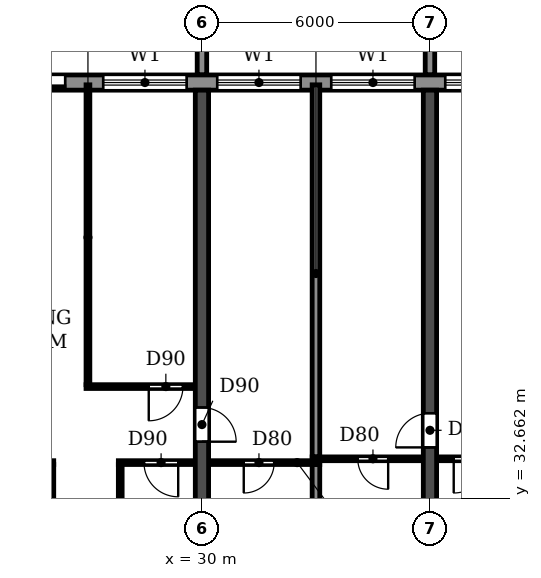
"""IFC4 building model, lengths in metres.
Left out: names, types, materials, properties, quantities, classifications, styles, units other than length and angle.
Written with IfcOpenShell. Run it as: python <this file> out.ifc"""

import sys

from ifc_helpers import new_model, si_unit, direction, frame, frame_2d, origin, place, context, subcontext, project, spatial, polyline, rectangle, outline, extrude, source, transform, mapped, element, fill, save


model = new_model("IFC4")
c1 = context("Model", 3, precision=1e-05, world=origin(), true_north=direction((0.0, 1.0)))
c2 = subcontext(c1, "Body", "Model", "MODEL_VIEW")
j1 = project(units=[si_unit("LENGTHUNIT", "METRE"), si_unit("PLANEANGLEUNIT", "RADIAN")], contexts=[c1])
p1 = place(None, origin())
s1 = spatial("IfcSite", under=j1, at=p1, CompositionType="ELEMENT")
p2 = place(p1, origin())
s2 = spatial("IfcBuilding", under=s1, at=p2, CompositionType="ELEMENT")
p3 = place(p2, frame((0.0, 0.0, 102.6)))
s3 = spatial("IfcBuildingStorey", under=s2, at=p3, CompositionType="ELEMENT", Elevation=102.6)
p4 = place(p3, frame((30.0, 30.525, 0.0), z_axis=(0.0, 0.0, 1.0), x_axis=(0.0, 1.0, 0.0)))
e1 = element("IfcWall", 1, at=p4, inside=s3, PredefinedType="SHEAR", context=c2, shape_type="SweptSolid", body=[
    extrude(rectangle(XDim=12.875, YDim=0.35, at=frame_2d((6.438, 0.0))), origin(), (0.0, 0.0, 1.0), 3.0),
])
p5 = place(p4, frame((3.625, 0.0, 0.0)))
e2 = element("IfcOpeningElement", 2, at=p5, cuts=e1, PredefinedType="OPENING", context=c2, shape_type="SweptSolid", body=[
    extrude(rectangle(XDim=0.9, YDim=2.1, at=frame_2d((0.45, 1.05))), frame((0.0, 0.185, 0.0), z_axis=(0.0, -1.0, 0.0), x_axis=(1.0, 0.0, 0.0)), (0.0, 0.0, 1.0), 0.37),
])
p6 = place(p3, frame((36.0, 30.525, 0.0), z_axis=(0.0, 0.0, 1.0), x_axis=(0.0, 1.0, 0.0)))
e3 = element("IfcWall", 3, at=p6, inside=s3, PredefinedType="SHEAR", context=c2, shape_type="SweptSolid", body=[
    extrude(rectangle(XDim=12.875, YDim=0.35, at=frame_2d((6.438, 0.0))), origin(), (0.0, 0.0, 1.0), 3.0),
])
p7 = place(p6, frame((3.475, 0.0, 0.0)))
e4 = element("IfcOpeningElement", 4, at=p7, cuts=e3, PredefinedType="OPENING", context=c2, shape_type="SweptSolid", body=[
    extrude(rectangle(XDim=0.9, YDim=2.1, at=frame_2d((0.45, 1.05))), frame((0.0, 0.185, 0.0), z_axis=(0.0, -1.0, 0.0), x_axis=(1.0, 0.0, 0.0)), (0.0, 0.0, 1.0), 0.37),
])
p8 = place(p3, frame((91.317, 43.6, 0.0), z_axis=(0.0, 0.0, 1.0), x_axis=(-1.0, 0.0, 0.0)))
e5 = element("IfcWall", 5, at=p8, inside=s3, PredefinedType="STANDARD", context=c2, shape_type="SweptSolid", body=[
    extrude(rectangle(XDim=80.634, YDim=0.4, at=frame_2d((40.317, 0.0))), origin(), (0.0, 0.0, 1.0), 3.0),
])
p9 = place(p8, frame((76.717, 0.0, 0.9)))
e6 = element("IfcOpeningElement", 6, at=p9, cuts=e5, PredefinedType="OPENING", context=c2, shape_type="SweptSolid", body=[
    extrude(rectangle(XDim=2.2, YDim=1.5, at=frame_2d((1.1, 0.75))), frame((0.0, 0.21, 0.0), z_axis=(0.0, -1.0, 0.0), x_axis=(1.0, 0.0, 0.0)), (0.0, 0.0, 1.0), 0.42),
])
p10 = place(p8, frame((73.917, 0.0, 0.0)))
e7 = element("IfcOpeningElement", 7, at=p10, cuts=e5, PredefinedType="OPENING", context=c2, shape_type="SweptSolid", body=[
    extrude(rectangle(XDim=1.8, YDim=2.4, at=frame_2d((0.9, 1.2))), frame((0.0, 0.21, 0.0), z_axis=(0.0, -1.0, 0.0), x_axis=(1.0, 0.0, 0.0)), (0.0, 0.0, 1.0), 0.42),
])
p11 = place(p8, frame((70.717, 0.0, 0.9)))
e8 = element("IfcOpeningElement", 8, at=p11, cuts=e5, PredefinedType="OPENING", context=c2, shape_type="SweptSolid", body=[
    extrude(rectangle(XDim=2.2, YDim=1.5, at=frame_2d((1.1, 0.75))), frame((0.0, 0.21, 0.0), z_axis=(0.0, -1.0, 0.0), x_axis=(1.0, 0.0, 0.0)), (0.0, 0.0, 1.0), 0.42),
])
p12 = place(p8, frame((67.717, 0.0, 0.9)))
e9 = element("IfcOpeningElement", 9, at=p12, cuts=e5, PredefinedType="OPENING", context=c2, shape_type="SweptSolid", body=[
    extrude(rectangle(XDim=2.2, YDim=1.5, at=frame_2d((1.1, 0.75))), frame((0.0, 0.21, 0.0), z_axis=(0.0, -1.0, 0.0), x_axis=(1.0, 0.0, 0.0)), (0.0, 0.0, 1.0), 0.42),
])
p13 = place(p8, frame((64.917, 0.0, 0.0)))
e10 = element("IfcOpeningElement", 10, at=p13, cuts=e5, PredefinedType="OPENING", context=c2, shape_type="SweptSolid", body=[
    extrude(rectangle(XDim=1.8, YDim=2.4, at=frame_2d((0.9, 1.2))), frame((0.0, 0.21, 0.0), z_axis=(0.0, -1.0, 0.0), x_axis=(1.0, 0.0, 0.0)), (0.0, 0.0, 1.0), 0.42),
])
p14 = place(p8, frame((61.717, 0.0, 0.9)))
e11 = element("IfcOpeningElement", 11, at=p14, cuts=e5, PredefinedType="OPENING", context=c2, shape_type="SweptSolid", body=[
    extrude(rectangle(XDim=2.2, YDim=1.5, at=frame_2d((1.1, 0.75))), frame((0.0, 0.21, 0.0), z_axis=(0.0, -1.0, 0.0), x_axis=(1.0, 0.0, 0.0)), (0.0, 0.0, 1.0), 0.42),
])
p15 = place(p8, frame((58.717, 0.0, 0.9)))
e12 = element("IfcOpeningElement", 12, at=p15, cuts=e5, PredefinedType="OPENING", context=c2, shape_type="SweptSolid", body=[
    extrude(rectangle(XDim=2.2, YDim=1.5, at=frame_2d((1.1, 0.75))), frame((0.0, 0.21, 0.0), z_axis=(0.0, -1.0, 0.0), x_axis=(1.0, 0.0, 0.0)), (0.0, 0.0, 1.0), 0.42),
])
p16 = place(p8, frame((55.717, 0.0, 0.9)))
e13 = element("IfcOpeningElement", 13, at=p16, cuts=e5, PredefinedType="OPENING", context=c2, shape_type="SweptSolid", body=[
    extrude(rectangle(XDim=2.2, YDim=1.5, at=frame_2d((1.1, 0.75))), frame((0.0, 0.21, 0.0), z_axis=(0.0, -1.0, 0.0), x_axis=(1.0, 0.0, 0.0)), (0.0, 0.0, 1.0), 0.42),
])
p17 = place(p8, frame((52.717, 0.0, 0.9)))
e14 = element("IfcOpeningElement", 14, at=p17, cuts=e5, PredefinedType="OPENING", context=c2, shape_type="SweptSolid", body=[
    extrude(rectangle(XDim=2.2, YDim=1.5, at=frame_2d((1.1, 0.75))), frame((0.0, 0.21, 0.0), z_axis=(0.0, -1.0, 0.0), x_axis=(1.0, 0.0, 0.0)), (0.0, 0.0, 1.0), 0.42),
])
p18 = place(p8, frame((49.917, 0.0, 0.0)))
e15 = element("IfcOpeningElement", 15, at=p18, cuts=e5, PredefinedType="OPENING", context=c2, shape_type="SweptSolid", body=[
    extrude(rectangle(XDim=1.8, YDim=2.4, at=frame_2d((0.9, 1.2))), frame((0.0, 0.21, 0.0), z_axis=(0.0, -1.0, 0.0), x_axis=(1.0, 0.0, 0.0)), (0.0, 0.0, 1.0), 0.42),
])
p19 = place(p8, frame((46.717, 0.0, 0.9)))
e16 = element("IfcOpeningElement", 16, at=p19, cuts=e5, PredefinedType="OPENING", context=c2, shape_type="SweptSolid", body=[
    extrude(rectangle(XDim=2.2, YDim=1.5, at=frame_2d((1.1, 0.75))), frame((0.0, 0.21, 0.0), z_axis=(0.0, -1.0, 0.0), x_axis=(1.0, 0.0, 0.0)), (0.0, 0.0, 1.0), 0.42),
])
p20 = place(p8, frame((43.917, 0.0, 0.0)))
e17 = element("IfcOpeningElement", 17, at=p20, cuts=e5, PredefinedType="OPENING", context=c2, shape_type="SweptSolid", body=[
    extrude(rectangle(XDim=1.8, YDim=2.4, at=frame_2d((0.9, 1.2))), frame((0.0, 0.21, 0.0), z_axis=(0.0, -1.0, 0.0), x_axis=(1.0, 0.0, 0.0)), (0.0, 0.0, 1.0), 0.42),
])
p21 = place(p8, frame((40.717, 0.0, 0.9)))
e18 = element("IfcOpeningElement", 18, at=p21, cuts=e5, PredefinedType="OPENING", context=c2, shape_type="SweptSolid", body=[
    extrude(rectangle(XDim=2.2, YDim=1.5, at=frame_2d((1.1, 0.75))), frame((0.0, 0.21, 0.0), z_axis=(0.0, -1.0, 0.0), x_axis=(1.0, 0.0, 0.0)), (0.0, 0.0, 1.0), 0.42),
])
p22 = place(p8, frame((37.717, 0.0, 0.9)))
e19 = element("IfcOpeningElement", 19, at=p22, cuts=e5, PredefinedType="OPENING", context=c2, shape_type="SweptSolid", body=[
    extrude(rectangle(XDim=2.2, YDim=1.5, at=frame_2d((1.1, 0.75))), frame((0.0, 0.21, 0.0), z_axis=(0.0, -1.0, 0.0), x_axis=(1.0, 0.0, 0.0)), (0.0, 0.0, 1.0), 0.42),
])
p23 = place(p8, frame((34.917, 0.0, 0.0)))
e20 = element("IfcOpeningElement", 20, at=p23, cuts=e5, PredefinedType="OPENING", context=c2, shape_type="SweptSolid", body=[
    extrude(rectangle(XDim=1.8, YDim=2.4, at=frame_2d((0.9, 1.2))), frame((0.0, 0.21, 0.0), z_axis=(0.0, -1.0, 0.0), x_axis=(1.0, 0.0, 0.0)), (0.0, 0.0, 1.0), 0.42),
])
p24 = place(p8, frame((31.717, 0.0, 0.9)))
e21 = element("IfcOpeningElement", 21, at=p24, cuts=e5, PredefinedType="OPENING", context=c2, shape_type="SweptSolid", body=[
    extrude(rectangle(XDim=2.2, YDim=1.5, at=frame_2d((1.1, 0.75))), frame((0.0, 0.21, 0.0), z_axis=(0.0, -1.0, 0.0), x_axis=(1.0, 0.0, 0.0)), (0.0, 0.0, 1.0), 0.42),
])
p25 = place(p8, frame((28.717, 0.0, 0.9)))
e22 = element("IfcOpeningElement", 22, at=p25, cuts=e5, PredefinedType="OPENING", context=c2, shape_type="SweptSolid", body=[
    extrude(rectangle(XDim=2.2, YDim=1.5, at=frame_2d((1.1, 0.75))), frame((0.0, 0.21, 0.0), z_axis=(0.0, -1.0, 0.0), x_axis=(1.0, 0.0, 0.0)), (0.0, 0.0, 1.0), 0.42),
])
p26 = place(p8, frame((25.917, 0.0, 0.0)))
e23 = element("IfcOpeningElement", 23, at=p26, cuts=e5, PredefinedType="OPENING", context=c2, shape_type="SweptSolid", body=[
    extrude(rectangle(XDim=1.8, YDim=2.4, at=frame_2d((0.9, 1.2))), frame((0.0, 0.21, 0.0), z_axis=(0.0, -1.0, 0.0), x_axis=(1.0, 0.0, 0.0)), (0.0, 0.0, 1.0), 0.42),
])
p27 = place(p8, frame((22.717, 0.0, 0.9)))
e24 = element("IfcOpeningElement", 24, at=p27, cuts=e5, PredefinedType="OPENING", context=c2, shape_type="SweptSolid", body=[
    extrude(rectangle(XDim=2.2, YDim=1.5, at=frame_2d((1.1, 0.75))), frame((0.0, 0.21, 0.0), z_axis=(0.0, -1.0, 0.0), x_axis=(1.0, 0.0, 0.0)), (0.0, 0.0, 1.0), 0.42),
])
p28 = place(p8, frame((19.717, 0.0, 0.9)))
e25 = element("IfcOpeningElement", 25, at=p28, cuts=e5, PredefinedType="OPENING", context=c2, shape_type="SweptSolid", body=[
    extrude(rectangle(XDim=2.2, YDim=1.5, at=frame_2d((1.1, 0.75))), frame((0.0, 0.21, 0.0), z_axis=(0.0, -1.0, 0.0), x_axis=(1.0, 0.0, 0.0)), (0.0, 0.0, 1.0), 0.42),
])
p29 = place(p8, frame((16.917, 0.0, 0.0)))
e26 = element("IfcOpeningElement", 26, at=p29, cuts=e5, PredefinedType="OPENING", context=c2, shape_type="SweptSolid", body=[
    extrude(rectangle(XDim=1.8, YDim=2.4, at=frame_2d((0.9, 1.2))), frame((0.0, 0.21, 0.0), z_axis=(0.0, -1.0, 0.0), x_axis=(1.0, 0.0, 0.0)), (0.0, 0.0, 1.0), 0.42),
])
p30 = place(p8, frame((13.717, 0.0, 0.9)))
e27 = element("IfcOpeningElement", 27, at=p30, cuts=e5, PredefinedType="OPENING", context=c2, shape_type="SweptSolid", body=[
    extrude(rectangle(XDim=2.2, YDim=1.5, at=frame_2d((1.1, 0.75))), frame((0.0, 0.21, 0.0), z_axis=(0.0, -1.0, 0.0), x_axis=(1.0, 0.0, 0.0)), (0.0, 0.0, 1.0), 0.42),
])
p31 = place(p8, frame((10.917, 0.0, 0.0)))
e28 = element("IfcOpeningElement", 28, at=p31, cuts=e5, PredefinedType="OPENING", context=c2, shape_type="SweptSolid", body=[
    extrude(rectangle(XDim=1.8, YDim=2.4, at=frame_2d((0.9, 1.2))), frame((0.0, 0.21, 0.0), z_axis=(0.0, -1.0, 0.0), x_axis=(1.0, 0.0, 0.0)), (0.0, 0.0, 1.0), 0.42),
])
p32 = place(p8, frame((7.717, 0.0, 0.9)))
e29 = element("IfcOpeningElement", 29, at=p32, cuts=e5, PredefinedType="OPENING", context=c2, shape_type="SweptSolid", body=[
    extrude(rectangle(XDim=2.2, YDim=1.5, at=frame_2d((1.1, 0.75))), frame((0.0, 0.21, 0.0), z_axis=(0.0, -1.0, 0.0), x_axis=(1.0, 0.0, 0.0)), (0.0, 0.0, 1.0), 0.42),
])
p33 = place(p8, frame((4.717, 0.0, 0.9)))
e30 = element("IfcOpeningElement", 30, at=p33, cuts=e5, PredefinedType="OPENING", context=c2, shape_type="SweptSolid", body=[
    extrude(rectangle(XDim=2.2, YDim=1.5, at=frame_2d((1.1, 0.75))), frame((0.0, 0.21, 0.0), z_axis=(0.0, -1.0, 0.0), x_axis=(1.0, 0.0, 0.0)), (0.0, 0.0, 1.0), 0.42),
])
p34 = place(p8, frame((1.917, 0.0, 0.0)))
e31 = element("IfcOpeningElement", 31, at=p34, cuts=e5, PredefinedType="OPENING", context=c2, shape_type="SweptSolid", body=[
    extrude(rectangle(XDim=1.8, YDim=2.4, at=frame_2d((0.9, 1.2))), frame((0.0, 0.21, 0.0), z_axis=(0.0, -1.0, 0.0), x_axis=(1.0, 0.0, 0.0)), (0.0, 0.0, 1.0), 0.42),
])
m1 = source(origin(), c2, "Body", "SweptSolid", [
    extrude(outline(polyline([(0.0, 0.0), (0.25, 0.0), (0.25, 3.1), (0.0, 3.1), (0.0, 0.0)])), origin(), (0.0, 0.0, 1.0), 3.1),
])
for number, where in (
    (32, (29.875, 43.8, 0.0)),
    (33, (35.875, 43.8, 0.0)),
):
    element("IfcWall", number, at=place(p3, frame(where)), inside=s3, PredefinedType="STANDARD", context=c2, shape_type="MappedRepresentation", body=[
        mapped(m1, transform((0.0, 0.0, 0.0))),
    ])
p35 = place(p3, frame((33.0, 30.535, 0.0), z_axis=(0.0, 0.0, 1.0), x_axis=(0.0, 1.0, 0.0)))
e34 = element("IfcWall", 34, at=p35, inside=s3, PredefinedType="PARTITIONING", context=c2, shape_type="SweptSolid", body=[
    extrude(rectangle(XDim=3.015, YDim=0.2, at=frame_2d((1.508, 0.0))), origin(), (0.0, 0.0, 1.0), 3.0),
])
p36 = place(p3, frame((33.0, 33.75, 0.0), z_axis=(0.0, 0.0, 1.0), x_axis=(0.0, 1.0, 0.0)))
e35 = element("IfcWall", 35, at=p36, inside=s3, PredefinedType="PARTITIONING", context=c2, shape_type="SweptSolid", body=[
    extrude(rectangle(XDim=9.79, YDim=0.2, at=frame_2d((4.895, 0.0))), origin(), (0.0, 0.0, 1.0), 3.0),
])
p37 = place(p3, frame((24.185, 33.6, 0.0), z_axis=(0.0, 0.0, 1.0), x_axis=(1.0, 0.0, 0.0)))
e36 = element("IfcWall", 36, at=p37, inside=s3, PredefinedType="PARTITIONING", context=c2, shape_type="SweptSolid", body=[
    extrude(rectangle(XDim=1.915, YDim=0.1, at=frame_2d((0.958, 0.0))), origin(), (0.0, 0.0, 1.0), 3.0),
])
p38 = place(p37, frame((0.44, 0.0, 0.0)))
e37 = element("IfcOpeningElement", 37, at=p38, cuts=e36, PredefinedType="OPENING", context=c2, shape_type="SweptSolid", body=[
    extrude(rectangle(XDim=0.8, YDim=2.1, at=frame_2d((0.4, 1.05))), frame((0.0, 0.06, 0.0), z_axis=(0.0, -1.0, 0.0), x_axis=(1.0, 0.0, 0.0)), (0.0, 0.0, 1.0), 0.12),
])
p39 = place(p3, frame((27.8, 33.6, 0.0), z_axis=(0.0, 0.0, 1.0), x_axis=(1.0, 0.0, 0.0)))
e38 = element("IfcWall", 38, at=p39, inside=s3, PredefinedType="PARTITIONING", context=c2, shape_type="SweptSolid", body=[
    extrude(rectangle(XDim=2.015, YDim=0.1, at=frame_2d((1.007, 0.0))), origin(), (0.0, 0.0, 1.0), 3.0),
])
p40 = place(p39, frame((0.675, 0.0, 0.0)))
e39 = element("IfcOpeningElement", 39, at=p40, cuts=e38, PredefinedType="OPENING", context=c2, shape_type="SweptSolid", body=[
    extrude(rectangle(XDim=0.9, YDim=2.1, at=frame_2d((0.45, 1.05))), frame((0.0, 0.06, 0.0), z_axis=(0.0, -1.0, 0.0), x_axis=(1.0, 0.0, 0.0)), (0.0, 0.0, 1.0), 0.12),
])
p41 = place(p3, frame((30.185, 33.6, 0.0), z_axis=(0.0, 0.0, 1.0), x_axis=(1.0, 0.0, 0.0)))
e40 = element("IfcWall", 40, at=p41, inside=s3, PredefinedType="PARTITIONING", context=c2, shape_type="SweptSolid", body=[
    extrude(rectangle(XDim=2.915, YDim=0.1, at=frame_2d((1.458, 0.0))), origin(), (0.0, 0.0, 1.0), 3.0),
])
p42 = place(p41, frame((0.915, 0.0, 0.0)))
e41 = element("IfcOpeningElement", 41, at=p42, cuts=e40, PredefinedType="OPENING", context=c2, shape_type="SweptSolid", body=[
    extrude(rectangle(XDim=0.8, YDim=2.1, at=frame_2d((0.4, 1.05))), frame((0.0, 0.06, 0.0), z_axis=(0.0, -1.0, 0.0), x_axis=(1.0, 0.0, 0.0)), (0.0, 0.0, 1.0), 0.12),
])
p43 = place(p3, frame((32.9, 33.7, 0.0), z_axis=(0.0, 0.0, 1.0), x_axis=(1.0, 0.0, 0.0)))
e42 = element("IfcWall", 42, at=p43, inside=s3, PredefinedType="PARTITIONING", context=c2, shape_type="SweptSolid", body=[
    extrude(rectangle(XDim=2.915, YDim=0.1, at=frame_2d((1.458, 0.0))), origin(), (0.0, 0.0, 1.0), 3.0),
])
p44 = place(p43, frame((1.2, 0.0, 0.0)))
e43 = element("IfcOpeningElement", 43, at=p44, cuts=e42, PredefinedType="OPENING", context=c2, shape_type="SweptSolid", body=[
    extrude(rectangle(XDim=0.8, YDim=2.1, at=frame_2d((0.4, 1.05))), frame((0.0, 0.06, 0.0), z_axis=(0.0, -1.0, 0.0), x_axis=(1.0, 0.0, 0.0)), (0.0, 0.0, 1.0), 0.12),
])
p45 = place(p3, frame((36.185, 33.7, 0.0), z_axis=(0.0, 0.0, 1.0), x_axis=(1.0, 0.0, 0.0)))
e44 = element("IfcWall", 44, at=p45, inside=s3, PredefinedType="PARTITIONING", context=c2, shape_type="SweptSolid", body=[
    extrude(rectangle(XDim=2.015, YDim=0.1, at=frame_2d((1.007, 0.0))), origin(), (0.0, 0.0, 1.0), 3.0),
])
p46 = place(p45, frame((0.44, 0.0, 0.0)))
e45 = element("IfcOpeningElement", 45, at=p46, cuts=e44, PredefinedType="OPENING", context=c2, shape_type="SweptSolid", body=[
    extrude(rectangle(XDim=0.9, YDim=2.1, at=frame_2d((0.45, 1.05))), frame((0.0, 0.06, 0.0), z_axis=(0.0, -1.0, 0.0), x_axis=(1.0, 0.0, 0.0)), (0.0, 0.0, 1.0), 0.12),
])
p47 = place(p3, frame((26.95, 35.6, 0.0), z_axis=(0.0, 0.0, 1.0), x_axis=(1.0, 0.0, 0.0)))
e46 = element("IfcWall", 46, at=p47, inside=s3, PredefinedType="PARTITIONING", context=c2, shape_type="SweptSolid", body=[
    extrude(rectangle(XDim=2.865, YDim=0.1, at=frame_2d((1.433, 0.0))), origin(), (0.0, 0.0, 1.0), 3.0),
])
p48 = place(p47, frame((1.65, 0.0, 0.0)))
e47 = element("IfcOpeningElement", 47, at=p48, cuts=e46, PredefinedType="OPENING", context=c2, shape_type="SweptSolid", body=[
    extrude(rectangle(XDim=0.9, YDim=2.1, at=frame_2d((0.45, 1.05))), frame((0.0, 0.06, 0.0), z_axis=(0.0, -1.0, 0.0), x_axis=(1.0, 0.0, 0.0)), (0.0, 0.0, 1.0), 0.12),
])
p49 = place(p3, frame((26.05, 30.535, 0.0), z_axis=(0.0, 0.0, 1.0), x_axis=(0.0, 1.0, 0.0)))
e48 = element("IfcWall", 48, at=p49, inside=s3, PredefinedType="PARTITIONING", context=c2, shape_type="SweptSolid", body=[
    extrude(rectangle(XDim=3.015, YDim=0.1, at=frame_2d((1.508, 0.0))), origin(), (0.0, 0.0, 1.0), 3.0),
])
p50 = place(p3, frame((27.0, 35.65, 0.0), z_axis=(0.0, 0.0, 1.0), x_axis=(0.0, 1.0, 0.0)))
e49 = element("IfcWall", 49, at=p50, inside=s3, PredefinedType="PARTITIONING", context=c2, shape_type="SweptSolid", body=[
    extrude(rectangle(XDim=7.89, YDim=0.1, at=frame_2d((3.945, 0.0))), origin(), (0.0, 0.0, 1.0), 3.0),
])
p51 = place(p3, frame((27.85, 30.535, 0.0), z_axis=(0.0, 0.0, 1.0), x_axis=(0.0, 1.0, 0.0)))
e50 = element("IfcWall", 50, at=p51, inside=s3, PredefinedType="PARTITIONING", context=c2, shape_type="SweptSolid", body=[
    extrude(rectangle(XDim=3.015, YDim=0.1, at=frame_2d((1.508, 0.0))), origin(), (0.0, 0.0, 1.0), 3.0),
])
p52 = place(p13, origin())
e51 = element("IfcDoor", 51, at=p52, inside=s3, OperationType="DOUBLE_DOOR_SLIDING", PredefinedType="DOOR", context=c2, shape_type="SweptSolid", body=[
    extrude(rectangle(XDim=1.8, YDim=2.4, at=frame_2d((0.9, 1.2))), frame((0.0, 0.025, 0.0), z_axis=(0.0, -1.0, 0.0), x_axis=(1.0, 0.0, 0.0)), (0.0, 0.0, 1.0), 0.05),
])
fill(e10, e51)
p53 = place(p14, origin())
e52 = element("IfcWindow", 52, at=p53, inside=s3, PartitioningType="DOUBLE_PANEL_HORIZONTAL", PredefinedType="WINDOW", context=c2, shape_type="SweptSolid", body=[
    extrude(rectangle(XDim=2.2, YDim=1.5, at=frame_2d((1.1, 0.75))), frame((0.0, 0.03, 0.0), z_axis=(0.0, -1.0, 0.0), x_axis=(1.0, 0.0, 0.0)), (0.0, 0.0, 1.0), 0.06),
])
fill(e11, e52)
p54 = place(p15, origin())
e53 = element("IfcWindow", 53, at=p54, inside=s3, PartitioningType="DOUBLE_PANEL_HORIZONTAL", PredefinedType="WINDOW", context=c2, shape_type="SweptSolid", body=[
    extrude(rectangle(XDim=2.2, YDim=1.5, at=frame_2d((1.1, 0.75))), frame((0.0, 0.03, 0.0), z_axis=(0.0, -1.0, 0.0), x_axis=(1.0, 0.0, 0.0)), (0.0, 0.0, 1.0), 0.06),
])
fill(e12, e53)
p55 = place(p16, origin())
e54 = element("IfcWindow", 54, at=p55, inside=s3, PartitioningType="DOUBLE_PANEL_HORIZONTAL", PredefinedType="WINDOW", context=c2, shape_type="SweptSolid", body=[
    extrude(rectangle(XDim=2.2, YDim=1.5, at=frame_2d((1.1, 0.75))), frame((0.0, 0.03, 0.0), z_axis=(0.0, -1.0, 0.0), x_axis=(1.0, 0.0, 0.0)), (0.0, 0.0, 1.0), 0.06),
])
fill(e13, e54)
p56 = place(p17, origin())
e55 = element("IfcWindow", 55, at=p56, inside=s3, PartitioningType="DOUBLE_PANEL_HORIZONTAL", PredefinedType="WINDOW", context=c2, shape_type="SweptSolid", body=[
    extrude(rectangle(XDim=2.2, YDim=1.5, at=frame_2d((1.1, 0.75))), frame((0.0, 0.03, 0.0), z_axis=(0.0, -1.0, 0.0), x_axis=(1.0, 0.0, 0.0)), (0.0, 0.0, 1.0), 0.06),
])
fill(e14, e55)
p57 = place(p42, frame((0.8, 0.0, 0.0), z_axis=(0.0, 0.0, 1.0), x_axis=(-1.0, 0.0, 0.0)))
e56 = element("IfcDoor", 56, at=p57, inside=s3, OperationType="SINGLE_SWING_RIGHT", PredefinedType="DOOR", context=c2, shape_type="SweptSolid", body=[
    extrude(rectangle(XDim=0.8, YDim=2.1, at=frame_2d((0.4, 1.05))), frame((0.0, 0.025, 0.0), z_axis=(0.0, -1.0, 0.0), x_axis=(1.0, 0.0, 0.0)), (0.0, 0.0, 1.0), 0.05),
])
fill(e41, e56)
p58 = place(p40, frame((0.9, 0.0, 0.0), z_axis=(0.0, 0.0, 1.0), x_axis=(-1.0, 0.0, 0.0)))
e57 = element("IfcDoor", 57, at=p58, inside=s3, OperationType="SINGLE_SWING_LEFT", PredefinedType="DOOR", context=c2, shape_type="SweptSolid", body=[
    extrude(rectangle(XDim=0.9, YDim=2.1, at=frame_2d((0.45, 1.05))), frame((0.0, 0.025, 0.0), z_axis=(0.0, -1.0, 0.0), x_axis=(1.0, 0.0, 0.0)), (0.0, 0.0, 1.0), 0.05),
])
fill(e39, e57)
p59 = place(p48, frame((0.9, 0.0, 0.0), z_axis=(0.0, 0.0, 1.0), x_axis=(-1.0, 0.0, 0.0)))
e58 = element("IfcDoor", 58, at=p59, inside=s3, OperationType="SINGLE_SWING_RIGHT", PredefinedType="DOOR", context=c2, shape_type="SweptSolid", body=[
    extrude(rectangle(XDim=0.9, YDim=2.1, at=frame_2d((0.45, 1.05))), frame((0.0, 0.025, 0.0), z_axis=(0.0, -1.0, 0.0), x_axis=(1.0, 0.0, 0.0)), (0.0, 0.0, 1.0), 0.05),
])
fill(e47, e58)
p60 = place(p5, frame((0.9, 0.0, 0.0), z_axis=(0.0, 0.0, 1.0), x_axis=(-1.0, 0.0, 0.0)))
e59 = element("IfcDoor", 59, at=p60, inside=s3, OperationType="SINGLE_SWING_RIGHT", PredefinedType="DOOR", context=c2, shape_type="SweptSolid", body=[
    extrude(rectangle(XDim=0.9, YDim=2.1, at=frame_2d((0.45, 1.05))), frame((0.0, 0.025, 0.0), z_axis=(0.0, -1.0, 0.0), x_axis=(1.0, 0.0, 0.0)), (0.0, 0.0, 1.0), 0.05),
])
fill(e2, e59)
p61 = place(p44, frame((0.8, 0.0, 0.0), z_axis=(0.0, 0.0, 1.0), x_axis=(-1.0, 0.0, 0.0)))
e60 = element("IfcDoor", 60, at=p61, inside=s3, OperationType="SINGLE_SWING_LEFT", PredefinedType="DOOR", context=c2, shape_type="SweptSolid", body=[
    extrude(rectangle(XDim=0.8, YDim=2.1, at=frame_2d((0.4, 1.05))), frame((0.0, 0.025, 0.0), z_axis=(0.0, -1.0, 0.0), x_axis=(1.0, 0.0, 0.0)), (0.0, 0.0, 1.0), 0.05),
])
fill(e43, e60)
p62 = place(p7, origin())
e61 = element("IfcDoor", 61, at=p62, inside=s3, OperationType="SINGLE_SWING_LEFT", PredefinedType="DOOR", context=c2, shape_type="SweptSolid", body=[
    extrude(rectangle(XDim=0.9, YDim=2.1, at=frame_2d((0.45, 1.05))), frame((0.0, 0.025, 0.0), z_axis=(0.0, -1.0, 0.0), x_axis=(1.0, 0.0, 0.0)), (0.0, 0.0, 1.0), 0.05),
])
fill(e4, e61)
p63 = place(p46, frame((0.9, 0.0, 0.0), z_axis=(0.0, 0.0, 1.0), x_axis=(-1.0, 0.0, 0.0)))
e62 = element("IfcDoor", 62, at=p63, inside=s3, OperationType="SINGLE_SWING_RIGHT", PredefinedType="DOOR", context=c2, shape_type="SweptSolid", body=[
    extrude(rectangle(XDim=0.9, YDim=2.1, at=frame_2d((0.45, 1.05))), frame((0.0, 0.025, 0.0), z_axis=(0.0, -1.0, 0.0), x_axis=(1.0, 0.0, 0.0)), (0.0, 0.0, 1.0), 0.05),
])
fill(e45, e62)
save(model, sys.argv[1])
